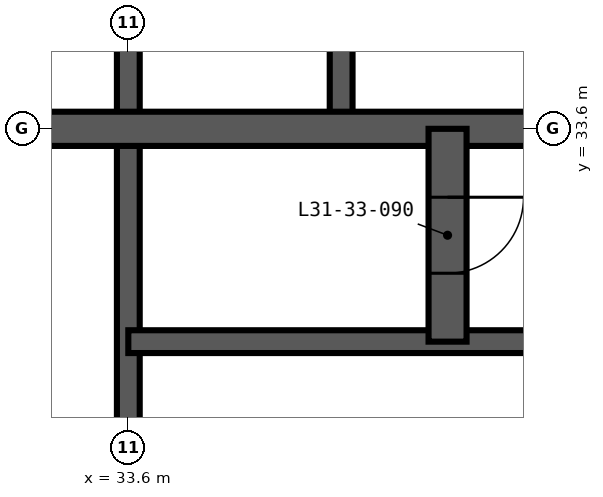
"""IFC4 building model, lengths in metres.
Left out: names, types, materials, properties, quantities, classifications, styles, units other than length and angle.
Written with IfcOpenShell. Run it as: python <this file> out.ifc"""

import sys

from ifc_helpers import new_model, si_unit, direction, frame, frame_2d, origin, place, context, subcontext, project, spatial, rectangle, extrude, element, fill, save


model = new_model("IFC4")
c1 = context("Model", 3, precision=1e-05, world=origin(), true_north=direction((0.0, 1.0)))
c2 = subcontext(c1, "Body", "Model", "MODEL_VIEW")
j1 = project(units=[si_unit("LENGTHUNIT", "METRE"), si_unit("PLANEANGLEUNIT", "RADIAN")], contexts=[c1])
p1 = place(None, origin())
s1 = spatial("IfcSite", under=j1, at=p1, CompositionType="ELEMENT")
p2 = place(p1, origin())
s2 = spatial("IfcBuilding", under=s1, at=p2, CompositionType="ELEMENT")
p3 = place(p2, frame((0.0, 0.0, 122.4)))
s3 = spatial("IfcBuildingStorey", under=s2, at=p3, CompositionType="ELEMENT", Elevation=122.4)
p4 = place(p3, frame((33.6, 16.8, -0.35), z_axis=(0.0, 0.0, 1.0), x_axis=(0.0, 1.0, 0.0)))
e1 = element("IfcWall", 1, at=p4, inside=s3, PredefinedType="SHEAR", context=c2, shape_type="SweptSolid", body=[
    extrude(rectangle(XDim=25.2, YDim=0.3, at=frame_2d((12.6, 0.0))), origin(), (0.0, 0.0, 1.0), 3.6),
])
p5 = place(p4, frame((22.5, 0.0, 0.35)))
e2 = element("IfcOpeningElement", 2, at=p5, cuts=e1, PredefinedType="OPENING", context=c2, shape_type="SweptSolid", body=[
    extrude(rectangle(XDim=1.2, YDim=2.2, at=frame_2d((0.6, 1.1))), frame((0.0, 0.16, 0.0), z_axis=(0.0, -1.0, 0.0), x_axis=(1.0, 0.0, 0.0)), (0.0, 0.0, 1.0), 0.32),
])
p6 = place(p4, frame((18.3, 0.0, 0.35)))
e3 = element("IfcOpeningElement", 3, at=p6, cuts=e1, PredefinedType="OPENING", context=c2, shape_type="SweptSolid", body=[
    extrude(rectangle(XDim=1.2, YDim=2.2, at=frame_2d((0.6, 1.1))), frame((0.0, 0.16, 0.0), z_axis=(0.0, -1.0, 0.0), x_axis=(1.0, 0.0, 0.0)), (0.0, 0.0, 1.0), 0.32),
])
for number, where, z_axis, x_axis in (
    (4, (36.4, 33.6, -0.35), (0.0, 0.0, 1.0), (0.0, 1.0, 0.0)),
    (5, (33.6, 30.8, -0.35), (0.0, 0.0, 1.0), (1.0, 0.0, 0.0)),
):
    element("IfcWall", number, at=place(p3, frame(where, z_axis=z_axis, x_axis=x_axis)), inside=s3, PredefinedType="SHEAR", context=c2, shape_type="SweptSolid", body=[
        extrude(rectangle(XDim=8.4, YDim=0.3, at=frame_2d((4.2, 0.0))), origin(), (0.0, 0.0, 1.0), 3.6),
    ])
p7 = place(p3, frame((16.8, 33.6, -0.35), z_axis=(0.0, 0.0, 1.0), x_axis=(1.0, 0.0, 0.0)))
e6 = element("IfcWall", 6, at=p7, inside=s3, PredefinedType="SHEAR", context=c2, shape_type="SweptSolid", body=[
    extrude(rectangle(XDim=25.2, YDim=0.45, at=frame_2d((12.6, 0.0))), origin(), (0.0, 0.0, 1.0), 3.6),
])
p8 = place(p7, frame((23.3, 0.0, 0.35)))
e7 = element("IfcOpeningElement", 7, at=p8, cuts=e6, PredefinedType="OPENING", context=c2, shape_type="SweptSolid", body=[
    extrude(rectangle(XDim=1.0, YDim=2.1, at=frame_2d((0.5, 1.05))), frame((0.0, 0.235, 0.0), z_axis=(0.0, -1.0, 0.0), x_axis=(1.0, 0.0, 0.0)), (0.0, 0.0, 1.0), 0.47),
])
p9 = place(p3, frame((37.8, 30.8, -0.35), z_axis=(0.0, 0.0, 1.0), x_axis=(0.0, 1.0, 0.0)))
e8 = element("IfcWall", 8, at=p9, inside=s3, PredefinedType="SHEAR", context=c2, shape_type="SweptSolid", body=[
    extrude(rectangle(XDim=2.8, YDim=0.5, at=frame_2d((1.4, 0.0))), origin(), (0.0, 0.0, 1.0), 3.6),
])
p10 = place(p9, frame((0.9, 0.0, 0.35)))
e9 = element("IfcOpeningElement", 9, at=p10, cuts=e8, PredefinedType="OPENING", context=c2, shape_type="SweptSolid", body=[
    extrude(rectangle(XDim=1.0, YDim=2.1, at=frame_2d((0.5, 1.05))), frame((0.0, 0.26, 0.0), z_axis=(0.0, -1.0, 0.0), x_axis=(1.0, 0.0, 0.0)), (0.0, 0.0, 1.0), 0.52),
])
p11 = place(p10, frame((1.0, 0.0, 0.0), z_axis=(0.0, 0.0, 1.0), x_axis=(-1.0, 0.0, 0.0)))
e10 = element("IfcDoor", 10, at=p11, inside=s3, OperationType="SINGLE_SWING_LEFT", PredefinedType="DOOR", context=c2, shape_type="SweptSolid", body=[
    extrude(rectangle(XDim=1.0, YDim=2.1, at=frame_2d((0.5, 1.05))), frame((0.0, 0.025, 0.0), z_axis=(0.0, -1.0, 0.0), x_axis=(1.0, 0.0, 0.0)), (0.0, 0.0, 1.0), 0.05),
])
fill(e9, e10)
save(model, sys.argv[1])
